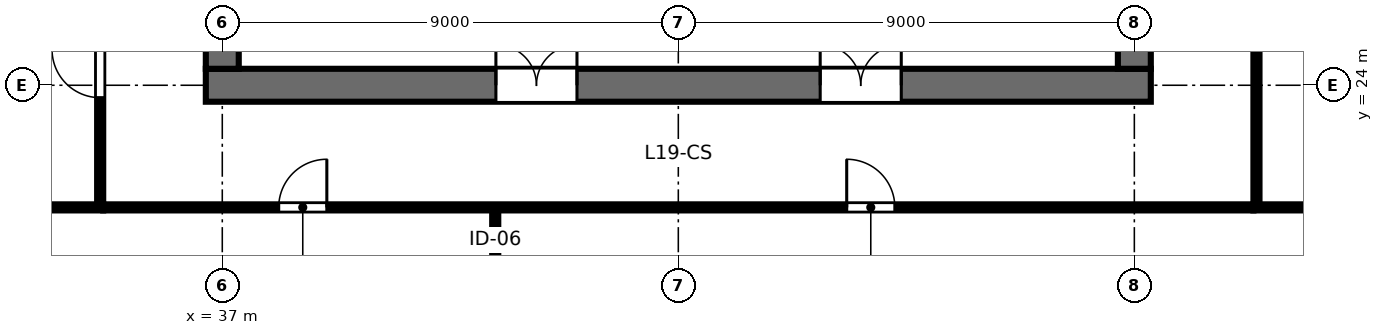
"""IFC4 building model, lengths in metres.
Left out: names, types, materials, properties, quantities, classifications, styles, units other than length and angle.
Written with IfcOpenShell. Run it as: python <this file> out.ifc"""

import sys

from ifc_helpers import new_model, si_unit, direction, frame, frame_2d, origin, place, context, subcontext, project, spatial, rectangle, extrude, element, fill, save


model = new_model("IFC4")
c1 = context("Model", 3, precision=1e-05, world=origin(), true_north=direction((0.0, 1.0)))
c2 = subcontext(c1, "Body", "Model", "MODEL_VIEW")
j1 = project(units=[si_unit("LENGTHUNIT", "METRE"), si_unit("PLANEANGLEUNIT", "RADIAN")], contexts=[c1])
p1 = place(None, origin())
s1 = spatial("IfcSite", under=j1, at=p1, CompositionType="ELEMENT")
p2 = place(p1, origin())
s2 = spatial("IfcBuilding", under=s1, at=p2, CompositionType="ELEMENT")
p3 = place(p2, frame((0.0, 0.0, 74.8)))
s3 = spatial("IfcBuildingStorey", under=s2, at=p3, CompositionType="ELEMENT", Elevation=74.8)
p4 = place(p3, frame((36.675, 24.0, 0.0), z_axis=(0.0, 0.0, 1.0), x_axis=(1.0, 0.0, 0.0)))
e1 = element("IfcWall", 1, at=p4, inside=s3, PredefinedType="SHEAR", context=c2, shape_type="SweptSolid", body=[
    extrude(rectangle(XDim=18.65, YDim=0.65, at=frame_2d((9.325, 0.0))), origin(), (0.0, 0.0, 1.0), 3.36),
])
p5 = place(p4, frame((5.725, 0.0, 0.0)))
e2 = element("IfcOpeningElement", 2, at=p5, cuts=e1, PredefinedType="OPENING", context=c2, shape_type="SweptSolid", body=[
    extrude(rectangle(XDim=1.6, YDim=2.15, at=frame_2d((0.8, 1.075))), frame((0.0, 0.335, 0.0), z_axis=(0.0, -1.0, 0.0), x_axis=(1.0, 0.0, 0.0)), (0.0, 0.0, 1.0), 0.67),
])
p6 = place(p4, frame((12.125, 0.0, 0.0)))
e3 = element("IfcOpeningElement", 3, at=p6, cuts=e1, PredefinedType="OPENING", context=c2, shape_type="SweptSolid", body=[
    extrude(rectangle(XDim=1.6, YDim=2.15, at=frame_2d((0.8, 1.075))), frame((0.0, 0.335, 0.0), z_axis=(0.0, -1.0, 0.0), x_axis=(1.0, 0.0, 0.0)), (0.0, 0.0, 1.0), 0.67),
])
p7 = place(p3, frame((37.0, 24.325, 0.0), z_axis=(0.0, 0.0, 1.0), x_axis=(0.0, 1.0, 0.0)))
e4 = element("IfcWall", 4, at=p7, inside=s3, PredefinedType="SHEAR", context=c2, shape_type="SweptSolid", body=[
    extrude(rectangle(XDim=15.35, YDim=0.65, at=frame_2d((7.675, 0.0))), origin(), (0.0, 0.0, 1.0), 3.36),
])
p8 = place(p7, frame((5.2, 0.0, 0.0)))
e5 = element("IfcOpeningElement", 5, at=p8, cuts=e4, PredefinedType="OPENING", context=c2, shape_type="SweptSolid", body=[
    extrude(rectangle(XDim=1.15, YDim=2.15, at=frame_2d((0.575, 1.075))), frame((0.0, 0.335, 0.0), z_axis=(0.0, -1.0, 0.0), x_axis=(1.0, 0.0, 0.0)), (0.0, 0.0, 1.0), 0.67),
])
p9 = place(p3, frame((55.0, 24.325, 0.0), z_axis=(0.0, 0.0, 1.0), x_axis=(0.0, 1.0, 0.0)))
e6 = element("IfcWall", 6, at=p9, inside=s3, PredefinedType="SHEAR", context=c2, shape_type="SweptSolid", body=[
    extrude(rectangle(XDim=15.35, YDim=0.65, at=frame_2d((7.675, 0.0))), origin(), (0.0, 0.0, 1.0), 3.36),
])
p10 = place(p9, frame((5.2, 0.0, 0.0)))
e7 = element("IfcOpeningElement", 7, at=p10, cuts=e6, PredefinedType="OPENING", context=c2, shape_type="SweptSolid", body=[
    extrude(rectangle(XDim=1.15, YDim=2.15, at=frame_2d((0.575, 1.075))), frame((0.0, 0.335, 0.0), z_axis=(0.0, -1.0, 0.0), x_axis=(1.0, 0.0, 0.0)), (0.0, 0.0, 1.0), 0.67),
])
p11 = place(p3, frame((42.387, 21.59, 0.0), z_axis=(0.0, 0.0, 1.0), x_axis=(0.0, -1.0, 0.0)))
e8 = element("IfcWall", 8, at=p11, inside=s3, PredefinedType="PARTITIONING", context=c2, shape_type="SweptSolid", body=[
    extrude(rectangle(XDim=11.41, YDim=0.12, at=frame_2d((5.705, 0.0))), origin(), (0.0, 0.0, 1.0), 2.64),
])
p12 = place(p11, frame((1.4, 0.0, 0.0)))
e9 = element("IfcOpeningElement", 9, at=p12, cuts=e8, PredefinedType="OPENING", context=c2, shape_type="SweptSolid", body=[
    extrude(rectangle(XDim=0.9, YDim=2.15, at=frame_2d((0.45, 1.075))), frame((0.0, 0.07, 0.0), z_axis=(0.0, -1.0, 0.0), x_axis=(1.0, 0.0, 0.0)), (0.0, 0.0, 1.0), 0.14),
])
p13 = place(p3, frame((34.65, 21.59, 0.0), z_axis=(0.0, 0.0, 1.0), x_axis=(1.0, 0.0, 0.0)))
e10 = element("IfcWall", 10, at=p13, inside=s3, PredefinedType="PARTITIONING", context=c2, shape_type="SweptSolid", body=[
    extrude(rectangle(XDim=22.7, YDim=0.12, at=frame_2d((11.35, 0.0))), origin(), (0.0, 0.0, 1.0), 2.64),
])
p14 = place(p13, frame((3.463, 0.0, 0.0)))
e11 = element("IfcOpeningElement", 11, at=p14, cuts=e10, PredefinedType="OPENING", context=c2, shape_type="SweptSolid", body=[
    extrude(rectangle(XDim=0.95, YDim=2.15, at=frame_2d((0.475, 1.075))), frame((0.0, 0.07, 0.0), z_axis=(0.0, -1.0, 0.0), x_axis=(1.0, 0.0, 0.0)), (0.0, 0.0, 1.0), 0.14),
])
p15 = place(p13, frame((14.673, 0.0, 0.0)))
e12 = element("IfcOpeningElement", 12, at=p15, cuts=e10, PredefinedType="OPENING", context=c2, shape_type="SweptSolid", body=[
    extrude(rectangle(XDim=0.95, YDim=2.15, at=frame_2d((0.475, 1.075))), frame((0.0, 0.07, 0.0), z_axis=(0.0, -1.0, 0.0), x_axis=(1.0, 0.0, 0.0)), (0.0, 0.0, 1.0), 0.14),
])
p16 = place(p3, frame((34.59, 21.65, 0.0), z_axis=(0.0, 0.0, 1.0), x_axis=(0.0, 1.0, 0.0)))
e13 = element("IfcWall", 13, at=p16, inside=s3, PredefinedType="PARTITIONING", context=c2, shape_type="SweptSolid", body=[
    extrude(rectangle(XDim=20.7, YDim=0.12, at=frame_2d((10.35, 0.0))), origin(), (0.0, 0.0, 1.0), 2.64),
])
p17 = place(p16, frame((2.105, 0.0, 0.0)))
e14 = element("IfcOpeningElement", 14, at=p17, cuts=e13, PredefinedType="OPENING", context=c2, shape_type="SweptSolid", body=[
    extrude(rectangle(XDim=0.95, YDim=2.15, at=frame_2d((0.475, 1.075))), frame((0.0, 0.07, 0.0), z_axis=(0.0, -1.0, 0.0), x_axis=(1.0, 0.0, 0.0)), (0.0, 0.0, 1.0), 0.14),
])
p18 = place(p16, frame((7.369, 0.0, 0.0)))
e15 = element("IfcOpeningElement", 15, at=p18, cuts=e13, PredefinedType="OPENING", context=c2, shape_type="SweptSolid", body=[
    extrude(rectangle(XDim=0.95, YDim=2.15, at=frame_2d((0.475, 1.075))), frame((0.0, 0.07, 0.0), z_axis=(0.0, -1.0, 0.0), x_axis=(1.0, 0.0, 0.0)), (0.0, 0.0, 1.0), 0.14),
])
p19 = place(p16, frame((15.139, 0.0, 0.0)))
e16 = element("IfcOpeningElement", 16, at=p19, cuts=e13, PredefinedType="OPENING", context=c2, shape_type="SweptSolid", body=[
    extrude(rectangle(XDim=0.95, YDim=2.15, at=frame_2d((0.475, 1.075))), frame((0.0, 0.07, 0.0), z_axis=(0.0, -1.0, 0.0), x_axis=(1.0, 0.0, 0.0)), (0.0, 0.0, 1.0), 0.14),
])
p20 = place(p3, frame((57.41, 21.65, 0.0), z_axis=(0.0, 0.0, 1.0), x_axis=(0.0, 1.0, 0.0)))
e17 = element("IfcWall", 17, at=p20, inside=s3, PredefinedType="PARTITIONING", context=c2, shape_type="SweptSolid", body=[
    extrude(rectangle(XDim=20.7, YDim=0.12, at=frame_2d((10.35, 0.0))), origin(), (0.0, 0.0, 1.0), 2.64),
])
p21 = place(p20, frame((4.931, 0.0, 0.0)))
e18 = element("IfcOpeningElement", 18, at=p21, cuts=e17, PredefinedType="OPENING", context=c2, shape_type="SweptSolid", body=[
    extrude(rectangle(XDim=0.95, YDim=2.15, at=frame_2d((0.475, 1.075))), frame((0.0, 0.07, 0.0), z_axis=(0.0, -1.0, 0.0), x_axis=(1.0, 0.0, 0.0)), (0.0, 0.0, 1.0), 0.14),
])
p22 = place(p20, frame((15.081, 0.0, 0.0)))
e19 = element("IfcOpeningElement", 19, at=p22, cuts=e17, PredefinedType="OPENING", context=c2, shape_type="SweptSolid", body=[
    extrude(rectangle(XDim=0.95, YDim=2.15, at=frame_2d((0.475, 1.075))), frame((0.0, 0.07, 0.0), z_axis=(0.0, -1.0, 0.0), x_axis=(1.0, 0.0, 0.0)), (0.0, 0.0, 1.0), 0.14),
])
for number, where, z_axis, x_axis in (
    (20, (34.65, 21.59, 0.0), (0.0, 0.0, 1.0), (-1.0, 0.0, 0.0)),
    (21, (57.35, 21.59, 0.0), (0.0, 0.0, 1.0), (1.0, 0.0, 0.0)),
):
    element("IfcWall", number, at=place(p3, frame(where, z_axis=z_axis, x_axis=x_axis)), inside=s3, PredefinedType="PARTITIONING", context=c2, shape_type="SweptSolid", body=[
        extrude(rectangle(XDim=13.47, YDim=0.12, at=frame_2d((6.735, 0.0))), origin(), (0.0, 0.0, 1.0), 2.64),
    ])
p23 = place(p5, origin())
e22 = element("IfcDoor", 22, at=p23, inside=s3, OperationType="DOUBLE_DOOR_SINGLE_SWING", PredefinedType="DOOR", context=c2, shape_type="SweptSolid", body=[
    extrude(rectangle(XDim=1.6, YDim=2.15, at=frame_2d((0.8, 1.075))), frame((0.0, 0.025, 0.0), z_axis=(0.0, -1.0, 0.0), x_axis=(1.0, 0.0, 0.0)), (0.0, 0.0, 1.0), 0.05),
])
fill(e2, e22)
p24 = place(p6, origin())
e23 = element("IfcDoor", 23, at=p24, inside=s3, OperationType="DOUBLE_DOOR_SINGLE_SWING", PredefinedType="DOOR", context=c2, shape_type="SweptSolid", body=[
    extrude(rectangle(XDim=1.6, YDim=2.15, at=frame_2d((0.8, 1.075))), frame((0.0, 0.025, 0.0), z_axis=(0.0, -1.0, 0.0), x_axis=(1.0, 0.0, 0.0)), (0.0, 0.0, 1.0), 0.05),
])
fill(e3, e23)
p25 = place(p14, origin())
e24 = element("IfcDoor", 24, at=p25, inside=s3, OperationType="SINGLE_SWING_RIGHT", PredefinedType="DOOR", context=c2, shape_type="SweptSolid", body=[
    extrude(rectangle(XDim=0.95, YDim=2.15, at=frame_2d((0.475, 1.075))), frame((0.0, 0.025, 0.0), z_axis=(0.0, -1.0, 0.0), x_axis=(1.0, 0.0, 0.0)), (0.0, 0.0, 1.0), 0.05),
])
fill(e11, e24)
p26 = place(p15, origin())
e25 = element("IfcDoor", 25, at=p26, inside=s3, OperationType="SINGLE_SWING_LEFT", PredefinedType="DOOR", context=c2, shape_type="SweptSolid", body=[
    extrude(rectangle(XDim=0.95, YDim=2.15, at=frame_2d((0.475, 1.075))), frame((0.0, 0.025, 0.0), z_axis=(0.0, -1.0, 0.0), x_axis=(1.0, 0.0, 0.0)), (0.0, 0.0, 1.0), 0.05),
])
fill(e12, e25)
p27 = place(p17, origin())
e26 = element("IfcDoor", 26, at=p27, inside=s3, OperationType="SINGLE_SWING_RIGHT", PredefinedType="DOOR", context=c2, shape_type="SweptSolid", body=[
    extrude(rectangle(XDim=0.95, YDim=2.15, at=frame_2d((0.475, 1.075))), frame((0.0, 0.025, 0.0), z_axis=(0.0, -1.0, 0.0), x_axis=(1.0, 0.0, 0.0)), (0.0, 0.0, 1.0), 0.05),
])
fill(e14, e26)
save(model, sys.argv[1])
